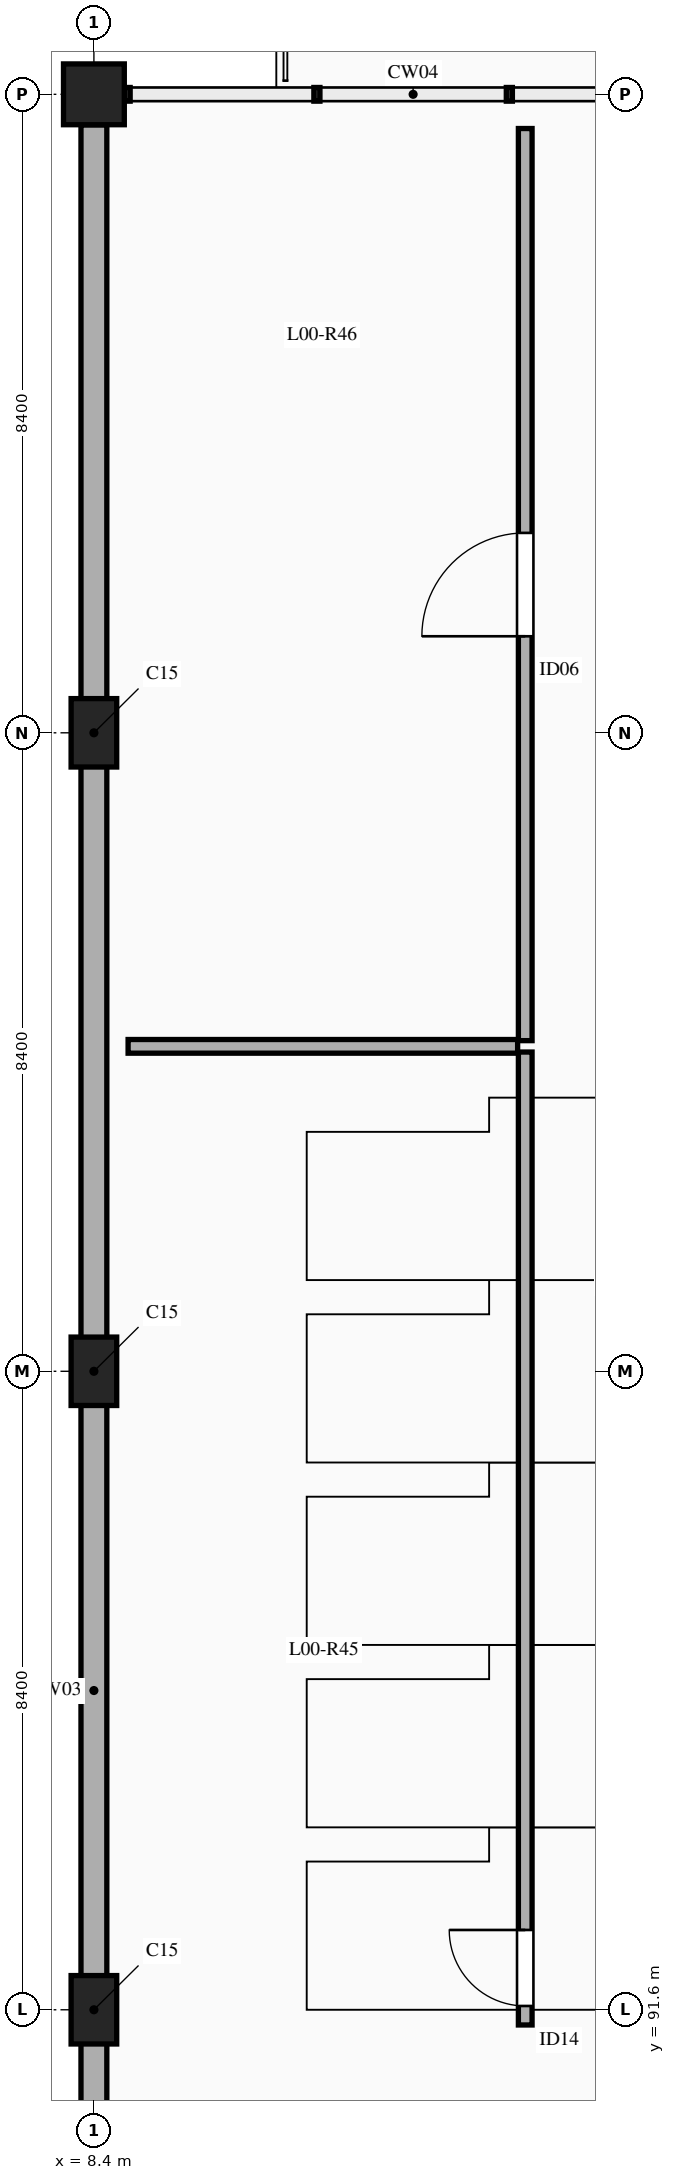
"""IFC4 building model, lengths in metres.
Left out: names, types, materials, properties, quantities, classifications, styles, units other than length and angle.
Written with IfcOpenShell. Run it as: python <this file> out.ifc"""

import sys

from ifc_helpers import new_model, si_unit, direction, frame, frame_2d, origin, origin_2d, place, context, subcontext, project, spatial, rectangle, extrude, element, fill, save


model = new_model("IFC4")
c1 = context("Model", 3, precision=1e-05, world=origin(), true_north=direction((0.0, 1.0)))
c2 = subcontext(c1, "Body", "Model", "MODEL_VIEW")
j1 = project(units=[si_unit("LENGTHUNIT", "METRE"), si_unit("PLANEANGLEUNIT", "RADIAN")], contexts=[c1])
p1 = place(None, origin())
s1 = spatial("IfcSite", under=j1, at=p1, CompositionType="ELEMENT")
p2 = place(p1, origin())
s2 = spatial("IfcBuilding", under=s1, at=p2, CompositionType="ELEMENT")
p3 = place(p2, origin())
s3 = spatial("IfcBuildingStorey", under=s2, at=p3, CompositionType="ELEMENT", Elevation=0.0)
for number, where, z_axis, x_axis in (
    (1, (8.4, 91.6, 0.0), (0.0, 0.0, 1.0), (0.0, 1.0, 0.0)),
    (2, (8.4, 100.0, 0.0), (0.0, 0.0, 1.0), (0.0, 1.0, 0.0)),
    (3, (8.4, 108.4, 0.0), (0.0, 0.0, 1.0), (0.0, 1.0, 0.0)),
):
    element("IfcColumn", number, at=place(p3, frame(where, z_axis=z_axis, x_axis=x_axis)), inside=s3, PredefinedType="COLUMN", context=c2, shape_type="SweptSolid", body=[
        extrude(rectangle(XDim=0.6, YDim=0.9, at=origin_2d()), origin(), (0.0, 0.0, 1.0), 5.4),
    ])
p4 = place(p3, frame((8.4, 116.8, 0.0), z_axis=(0.0, 0.0, 1.0), x_axis=(1.0, 0.0, 0.0)))
e4 = element("IfcColumn", 4, at=p4, inside=s3, PredefinedType="COLUMN", context=c2, shape_type="SweptSolid", body=[
    extrude(rectangle(XDim=0.8, YDim=0.8, at=origin_2d()), origin(), (0.0, 0.0, 1.0), 5.4),
])
p5 = place(p3, frame((8.4, 83.602, 0.0), z_axis=(0.0, 0.0, 1.0), x_axis=(0.0, 1.0, 0.0)))
e5 = element("IfcWall", 5, at=p5, inside=s3, PredefinedType="SOLIDWALL", context=c2, shape_type="SweptSolid", body=[
    extrude(rectangle(XDim=7.696, YDim=0.34, at=frame_2d((3.848, 0.0))), origin(), (0.0, 0.0, 1.0), 4.65),
])
p6 = place(p5, frame((1.374, 0.0, 0.9)))
e6 = element("IfcOpeningElement", 6, at=p6, cuts=e5, PredefinedType="OPENING", context=c2, shape_type="SweptSolid", body=[
    extrude(rectangle(XDim=1.1, YDim=1.95, at=frame_2d((0.55, 0.975))), frame((0.0, 0.18, 0.0), z_axis=(0.0, -1.0, 0.0), x_axis=(1.0, 0.0, 0.0)), (0.0, 0.0, 1.0), 0.36),
])
p7 = place(p5, frame((5.222, 0.0, 0.9)))
e7 = element("IfcOpeningElement", 7, at=p7, cuts=e5, PredefinedType="OPENING", context=c2, shape_type="SweptSolid", body=[
    extrude(rectangle(XDim=1.1, YDim=1.95, at=frame_2d((0.55, 0.975))), frame((0.0, 0.18, 0.0), z_axis=(0.0, -1.0, 0.0), x_axis=(1.0, 0.0, 0.0)), (0.0, 0.0, 1.0), 0.36),
])
for number, where, z_axis, x_axis in (
    (8, (8.4, 91.902, 0.0), (0.0, 0.0, 1.0), (0.0, 1.0, 0.0)),
    (9, (8.4, 100.302, 0.0), (0.0, 0.0, 1.0), (0.0, 1.0, 0.0)),
):
    element("IfcWall", number, at=place(p3, frame(where, z_axis=z_axis, x_axis=x_axis)), inside=s3, PredefinedType="SOLIDWALL", context=c2, shape_type="SweptSolid", body=[
        extrude(rectangle(XDim=7.796, YDim=0.34, at=frame_2d((3.898, 0.0))), origin(), (0.0, 0.0, 1.0), 4.65),
    ])
p8 = place(p3, frame((8.4, 108.702, 0.0), z_axis=(0.0, 0.0, 1.0), x_axis=(0.0, 1.0, 0.0)))
e10 = element("IfcWall", 10, at=p8, inside=s3, PredefinedType="SOLIDWALL", context=c2, shape_type="SweptSolid", body=[
    extrude(rectangle(XDim=7.696, YDim=0.34, at=frame_2d((3.848, 0.0))), origin(), (0.0, 0.0, 1.0), 4.65),
])
p9 = place(p3, frame((14.075, 91.4, 0.0), z_axis=(0.0, 0.0, 1.0), x_axis=(0.0, 1.0, 0.0)))
e11 = element("IfcWall", 11, at=p9, inside=s3, PredefinedType="PARTITIONING", context=c2, shape_type="SweptSolid", body=[
    extrude(rectangle(XDim=12.8, YDim=0.18, at=frame_2d((6.4, 0.0))), origin(), (0.0, 0.0, 1.0), 4.35),
])
p10 = place(p9, frame((0.25, 0.0, 0.0)))
e12 = element("IfcOpeningElement", 12, at=p10, cuts=e11, PredefinedType="OPENING", context=c2, shape_type="SweptSolid", body=[
    extrude(rectangle(XDim=1.0, YDim=2.15, at=frame_2d((0.5, 1.075))), frame((0.0, 0.1, 0.0), z_axis=(0.0, -1.0, 0.0), x_axis=(1.0, 0.0, 0.0)), (0.0, 0.0, 1.0), 0.2),
])
p11 = place(p3, frame((14.075, 104.35, 0.0), z_axis=(0.0, 0.0, 1.0), x_axis=(0.0, 1.0, 0.0)))
e13 = element("IfcWall", 13, at=p11, inside=s3, PredefinedType="PARTITIONING", context=c2, shape_type="SweptSolid", body=[
    extrude(rectangle(XDim=12.0, YDim=0.18, at=frame_2d((6.0, 0.0))), origin(), (0.0, 0.0, 1.0), 4.35),
])
p12 = place(p11, frame((5.32, 0.0, 0.0)))
e14 = element("IfcOpeningElement", 14, at=p12, cuts=e13, PredefinedType="OPENING", context=c2, shape_type="SweptSolid", body=[
    extrude(rectangle(XDim=1.36, YDim=2.3, at=frame_2d((0.68, 1.15))), frame((0.0, 0.1, 0.0), z_axis=(0.0, -1.0, 0.0), x_axis=(1.0, 0.0, 0.0)), (0.0, 0.0, 1.0), 0.2),
])
p13 = place(p3, frame((8.85, 104.275, 0.0), z_axis=(0.0, 0.0, 1.0), x_axis=(1.0, 0.0, 0.0)))
e15 = element("IfcWall", 15, at=p13, inside=s3, PredefinedType="PARTITIONING", context=c2, shape_type="SweptSolid", body=[
    extrude(rectangle(XDim=5.125, YDim=0.18, at=frame_2d((2.562, 0.0))), origin(), (0.0, 0.0, 1.0), 4.35),
])
p14 = place(p10, origin())
e16 = element("IfcDoor", 16, at=p14, inside=s3, OperationType="SINGLE_SWING_RIGHT", PredefinedType="DOOR", context=c2, shape_type="SweptSolid", body=[
    extrude(rectangle(XDim=1.0, YDim=2.15, at=frame_2d((0.5, 1.075))), frame((0.0, 0.025, 0.0), z_axis=(0.0, -1.0, 0.0), x_axis=(1.0, 0.0, 0.0)), (0.0, 0.0, 1.0), 0.05),
])
fill(e12, e16)
p15 = place(p12, origin())
e17 = element("IfcDoor", 17, at=p15, inside=s3, OperationType="SINGLE_SWING_LEFT", PredefinedType="DOOR", context=c2, shape_type="SweptSolid", body=[
    extrude(rectangle(XDim=1.36, YDim=2.3, at=frame_2d((0.68, 1.15))), frame((0.0, 0.025, 0.0), z_axis=(0.0, -1.0, 0.0), x_axis=(1.0, 0.0, 0.0)), (0.0, 0.0, 1.0), 0.05),
])
fill(e14, e17)
save(model, sys.argv[1])
